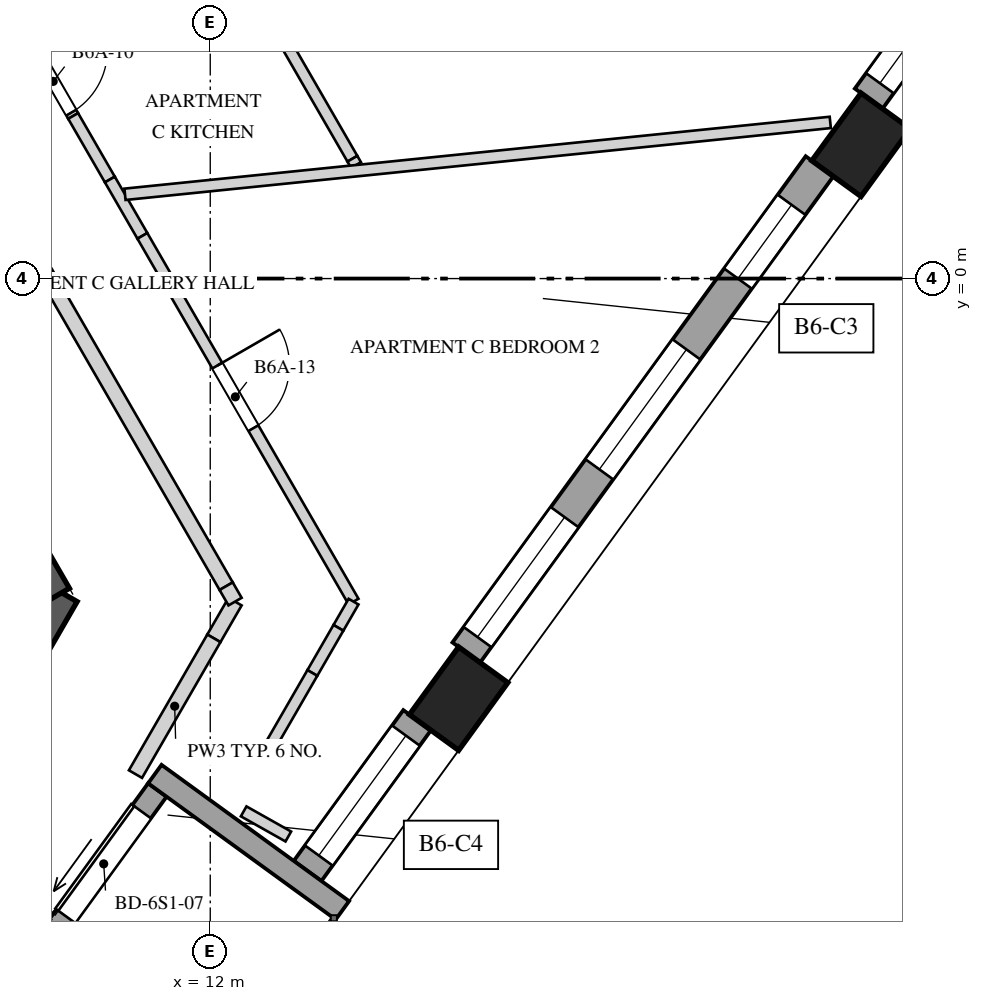
"""IFC4 building model, lengths in metres.
Left out: names, types, materials, properties, quantities, classifications, styles, units other than length and angle.
Written with IfcOpenShell. Run it as: python <this file> out.ifc"""

import sys

from ifc_helpers import new_model, si_unit, direction, frame, frame_2d, origin, origin_2d, place, context, subcontext, project, spatial, polyline, rectangle, outline, extrude, element, fill, save


model = new_model("IFC4")
c1 = context("Model", 3, precision=1e-05, world=origin(), true_north=direction((0.0, 1.0)))
c2 = subcontext(c1, "Body", "Model", "MODEL_VIEW")
j1 = project(units=[si_unit("LENGTHUNIT", "METRE"), si_unit("PLANEANGLEUNIT", "RADIAN")], contexts=[c1])
p1 = place(None, origin())
s1 = spatial("IfcSite", under=j1, at=p1, CompositionType="ELEMENT")
p2 = place(p1, origin())
s2 = spatial("IfcBuilding", under=s1, at=p2, CompositionType="ELEMENT")
p3 = place(p2, frame((0.0, 0.0, 245.2)))
s3 = spatial("IfcBuildingStorey", under=s2, at=p3, CompositionType="ELEMENT", Elevation=245.2)
p4 = place(p3, frame((8.501, -6.575, 0.0), z_axis=(0.0, 0.0, 1.0), x_axis=(0.499995765644, 0.866027848477, 0.0)))
e1 = element("IfcWall", 1, at=p4, inside=s3, PredefinedType="SHEAR", context=c2, shape_type="SweptSolid", body=[
    extrude(rectangle(XDim=2.887, YDim=0.7, at=frame_2d((1.443, 0.0))), origin(), (0.0, 0.0, 1.0), 4.0),
])
p5 = place(p3, frame((9.844, -4.25, 0.0), z_axis=(0.0, 0.0, 1.0), x_axis=(-0.500003331888, 0.866023480109, 0.0)))
e2 = element("IfcWall", 2, at=p5, inside=s3, PredefinedType="SHEAR", context=c2, shape_type="SweptSolid", body=[
    extrude(rectangle(XDim=17.205, YDim=0.7, at=frame_2d((8.603, 0.0))), origin(), (0.0, 0.0, 1.0), 4.0),
])
p6 = place(p5, frame((6.877, 0.0, 0.0)))
e3 = element("IfcOpeningElement", 3, at=p6, cuts=e2, PredefinedType="OPENING", context=c2, shape_type="SweptSolid", body=[
    extrude(rectangle(XDim=1.0, YDim=2.4, at=frame_2d((0.5, 1.2))), frame((0.0, 0.36, 0.0), z_axis=(0.0, -1.0, 0.0), x_axis=(1.0, 0.0, 0.0)), (0.0, 0.0, 1.0), 0.72),
])
for number, where, z_axis, x_axis in (
    (4, (15.268, -5.526, 0.0), (0.0, 0.0, 1.0), (0.588, 0.809, 0.0)),
    (5, (20.562, 1.76, 0.0), (0.0, 0.0, 1.0), (0.588, 0.809, 0.0)),
):
    element("IfcColumn", number, at=place(p3, frame(where, z_axis=z_axis, x_axis=x_axis)), inside=s3, PredefinedType="COLUMN", context=c2, shape_type="SweptSolid", body=[
        extrude(rectangle(XDim=1.1, YDim=0.8, at=origin_2d()), origin(), (0.0, 0.0, 1.0), 4.0),
    ])
p7 = place(p3, frame((13.281, -7.793, 0.0), z_axis=(0.0, 0.0, 1.0), x_axis=(0.587792773076, 0.809011530152, 0.0)))
e6 = element("IfcWall", 6, at=p7, inside=s3, PredefinedType="SOLIDWALL", context=c2, shape_type="SweptSolid", body=[
    extrude(rectangle(XDim=2.452, YDim=0.45, at=frame_2d((1.226, 0.0))), origin(), (0.0, 0.0, 1.0), 3.3),
])
p8 = place(p7, frame((0.251, 0.0, 0.4)))
e7 = element("IfcOpeningElement", 7, at=p8, cuts=e6, PredefinedType="OPENING", context=c2, shape_type="SweptSolid", body=[
    extrude(rectangle(XDim=1.95, YDim=2.75, at=frame_2d((0.975, 1.375))), frame((0.0, 0.235, 0.0), z_axis=(0.0, -1.0, 0.0), x_axis=(1.0, 0.0, 0.0)), (0.0, 0.0, 1.0), 0.47),
])
p9 = place(p3, frame((15.368, -4.92, 0.0), z_axis=(0.0, 0.0, 1.0), x_axis=(0.587782407267, 0.809019061399, 0.0)))
e8 = element("IfcWall", 8, at=p9, inside=s3, PredefinedType="SOLIDWALL", context=c2, shape_type="SweptSolid", body=[
    extrude(rectangle(XDim=7.907, YDim=0.45, at=frame_2d((3.953, 0.0))), origin(), (0.0, 0.0, 1.0), 3.3),
])
p10 = place(p9, frame((0.251, 0.0, 0.4)))
e9 = element("IfcOpeningElement", 9, at=p10, cuts=e8, PredefinedType="OPENING", context=c2, shape_type="SweptSolid", body=[
    extrude(rectangle(XDim=1.95, YDim=2.75, at=frame_2d((0.975, 1.375))), frame((0.0, 0.235, 0.0), z_axis=(0.0, -1.0, 0.0), x_axis=(1.0, 0.0, 0.0)), (0.0, 0.0, 1.0), 0.47),
])
p11 = place(p9, frame((2.978, 0.0, 0.4)))
e10 = element("IfcOpeningElement", 10, at=p11, cuts=e8, PredefinedType="OPENING", context=c2, shape_type="SweptSolid", body=[
    extrude(rectangle(XDim=1.95, YDim=2.75, at=frame_2d((0.975, 1.375))), frame((0.0, 0.235, 0.0), z_axis=(0.0, -1.0, 0.0), x_axis=(1.0, 0.0, 0.0)), (0.0, 0.0, 1.0), 0.47),
])
p12 = place(p9, frame((6.081, 0.0, 0.4)))
e11 = element("IfcOpeningElement", 11, at=p12, cuts=e8, PredefinedType="OPENING", context=c2, shape_type="SweptSolid", body=[
    extrude(rectangle(XDim=1.2, YDim=2.75, at=frame_2d((0.6, 1.375))), frame((0.0, 0.235, 0.0), z_axis=(0.0, -1.0, 0.0), x_axis=(1.0, 0.0, 0.0)), (0.0, 0.0, 1.0), 0.47),
])
p13 = place(p3, frame((20.662, 2.367, 0.0), z_axis=(0.0, 0.0, 1.0), x_axis=(0.587792773076, 0.809011530152, 0.0)))
e12 = element("IfcWall", 12, at=p13, inside=s3, PredefinedType="SOLIDWALL", context=c2, shape_type="SweptSolid", body=[
    extrude(rectangle(XDim=2.452, YDim=0.45, at=frame_2d((1.226, 0.0))), origin(), (0.0, 0.0, 1.0), 3.3),
])
p14 = place(p13, frame((0.251, 0.0, 0.4)))
e13 = element("IfcOpeningElement", 13, at=p14, cuts=e12, PredefinedType="OPENING", context=c2, shape_type="SweptSolid", body=[
    extrude(rectangle(XDim=1.95, YDim=2.75, at=frame_2d((0.975, 1.375))), frame((0.0, 0.235, 0.0), z_axis=(0.0, -1.0, 0.0), x_axis=(1.0, 0.0, 0.0)), (0.0, 0.0, 1.0), 0.47),
])
p15 = place(p3, frame((9.892, -8.672, 0.0), z_axis=(0.0, 0.0, 1.0), x_axis=(0.587833242688, 0.808982125137, 0.0)))
e14 = element("IfcWall", 14, at=p15, inside=s3, PredefinedType="SOLIDWALL", context=c2, shape_type="SweptSolid", body=[
    extrude(rectangle(XDim=2.402, YDim=0.3, at=frame_2d((1.201, 0.0))), origin(), (0.0, 0.0, 1.0), 3.3),
])
p16 = place(p15, frame((0.351, 0.0, 0.0)))
e15 = element("IfcOpeningElement", 15, at=p16, cuts=e14, PredefinedType="OPENING", context=c2, shape_type="SweptSolid", body=[
    extrude(rectangle(XDim=1.7, YDim=2.5, at=frame_2d((0.85, 1.25))), frame((0.0, 0.16, 0.0), z_axis=(0.0, -1.0, 0.0), x_axis=(1.0, 0.0, 0.0)), (0.0, 0.0, 1.0), 0.32),
])
p17 = place(p3, frame((13.739, -8.312, 0.0), z_axis=(0.0, 0.0, 1.0), x_axis=(-0.80902328748, 0.587776590479, 0.0)))
e16 = element("IfcWall", 16, at=p17, inside=s3, PredefinedType="SOLIDWALL", context=c2, shape_type="SweptSolid", body=[
    extrude(rectangle(XDim=3.05, YDim=0.3, at=frame_2d((1.525, 0.0))), origin(), (0.0, 0.0, 1.0), 3.3),
])
p18 = place(p3, frame((9.321, 3.655, 0.0), z_axis=(0.0, 0.0, 1.0), x_axis=(0.499980071345, -0.866036909293, 0.0)))
e17 = element("IfcWall", 17, at=p18, inside=s3, PredefinedType="PARTITIONING", context=c2, shape_type="SweptSolid", body=[
    extrude(outline(polyline([(0.0, 0.0), (1.75, 0.0), (1.75, 3.65), (0.892, 3.65), (0.892, 2.55), (0.0, 2.55), (0.0, 0.0)])), frame((0.0, 0.075, 0.0), z_axis=(0.0, -1.0, 0.0), x_axis=(1.0, 0.0, 0.0)), (0.0, 0.0, 1.0), 0.15),
])
p19 = place(p18, frame((0.75, 0.0, 0.0)))
e18 = element("IfcOpeningElement", 18, at=p19, cuts=e17, PredefinedType="OPENING", context=c2, shape_type="SweptSolid", body=[
    extrude(rectangle(XDim=0.95, YDim=2.4, at=frame_2d((0.475, 1.2))), frame((0.0, 0.085, 0.0), z_axis=(0.0, -1.0, 0.0), x_axis=(1.0, 0.0, 0.0)), (0.0, 0.0, 1.0), 0.17),
])
p20 = place(p3, frame((10.196, 2.139, 0.0), z_axis=(0.0, 0.0, 1.0), x_axis=(0.500109093648, -0.865962409375, 0.0)))
e19 = element("IfcWall", 19, at=p20, inside=s3, PredefinedType="PARTITIONING", context=c2, shape_type="SweptSolid", body=[
    extrude(rectangle(XDim=0.966, YDim=0.15, at=frame_2d((0.483, 0.0))), origin(), (0.0, 0.0, 1.0), 3.65),
])
p21 = place(p3, frame((10.679, 1.303, 0.0), z_axis=(0.0, 0.0, 1.0), x_axis=(0.500035209441, -0.86600507465, 0.0)))
e20 = element("IfcWall", 20, at=p21, inside=s3, PredefinedType="PARTITIONING", context=c2, shape_type="SweptSolid", body=[
    extrude(rectangle(XDim=0.856, YDim=0.15, at=frame_2d((0.428, 0.0))), origin(), (0.0, 0.0, 1.0), 2.75),
])
p22 = place(p3, frame((11.107, 0.562, 0.0), z_axis=(0.0, 0.0, 1.0), x_axis=(0.499981090573, -0.866036320872, 0.0)))
e21 = element("IfcWall", 21, at=p22, inside=s3, PredefinedType="PARTITIONING", context=c2, shape_type="SweptSolid", body=[
    extrude(rectangle(XDim=5.556, YDim=0.15, at=frame_2d((2.778, 0.0))), origin(), (0.0, 0.0, 1.0), 3.65),
])
p23 = place(p22, frame((1.971, 0.0, 0.0)))
e22 = element("IfcOpeningElement", 22, at=p23, cuts=e21, PredefinedType="OPENING", context=c2, shape_type="SweptSolid", body=[
    extrude(rectangle(XDim=0.95, YDim=2.4, at=frame_2d((0.475, 1.2))), frame((0.0, 0.085, 0.0), z_axis=(0.0, -1.0, 0.0), x_axis=(1.0, 0.0, 0.0)), (0.0, 0.0, 1.0), 0.17),
])
p24 = place(p3, frame((12.563, 3.84, 0.0), z_axis=(0.0, 0.0, 1.0), x_axis=(0.500016176693, -0.866016063965, 0.0)))
e23 = element("IfcWall", 23, at=p24, inside=s3, PredefinedType="PARTITIONING", context=c2, shape_type="SweptSolid", body=[
    extrude(rectangle(XDim=2.614, YDim=0.15, at=frame_2d((1.307, 0.0))), origin(), (0.0, 0.0, 1.0), 3.65),
])
p25 = place(p3, frame((13.87, 1.576, 0.0), z_axis=(0.0, 0.0, 1.0), x_axis=(0.49972245349, -0.866185586049, 0.0)))
e24 = element("IfcWall", 24, at=p25, inside=s3, PredefinedType="PARTITIONING", context=c2, shape_type="SweptSolid", body=[
    extrude(rectangle(XDim=0.095, YDim=0.15, at=frame_2d((0.048, 0.0))), origin(), (0.0, 0.0, 1.0), 2.75),
])
p26 = place(p3, frame((12.44, -7.009, 0.0), z_axis=(0.0, 0.0, 1.0), x_axis=(0.871323961853, -0.490708216256, 0.0)))
e25 = element("IfcWall", 25, at=p26, inside=s3, PredefinedType="PARTITIONING", context=c2, shape_type="SweptSolid", body=[
    extrude(rectangle(XDim=0.674, YDim=0.15, at=frame_2d((0.337, 0.0))), origin(), (0.0, 0.0, 1.0), 3.65),
])
p27 = place(p3, frame((13.885, -4.25, 0.0), z_axis=(0.0, 0.0, 1.0), x_axis=(-0.499899443193, -0.866083452501, 0.0)))
e26 = element("IfcWall", 26, at=p27, inside=s3, PredefinedType="PARTITIONING", context=c2, shape_type="SweptSolid", body=[
    extrude(rectangle(XDim=0.398, YDim=0.15, at=frame_2d((0.199, 0.0))), origin(), (0.0, 0.0, 1.0), 3.65),
])
p28 = place(p3, frame((13.686, -4.595, 0.0), z_axis=(0.0, 0.0, 1.0), x_axis=(-0.500081895979, -0.865978115955, 0.0)))
e27 = element("IfcWall", 27, at=p28, inside=s3, PredefinedType="PARTITIONING", context=c2, shape_type="SweptSolid", body=[
    extrude(rectangle(XDim=0.686, YDim=0.15, at=frame_2d((0.343, 0.0))), origin(), (0.0, 0.0, 1.0), 2.95),
])
p29 = place(p3, frame((13.343, -5.189, 0.0), z_axis=(0.0, 0.0, 1.0), x_axis=(-0.500009088543, -0.866020156448, 0.0)))
e28 = element("IfcWall", 28, at=p29, inside=s3, PredefinedType="PARTITIONING", context=c2, shape_type="SweptSolid", body=[
    extrude(rectangle(XDim=1.106, YDim=0.15, at=frame_2d((0.553, 0.0))), origin(), (0.0, 0.0, 1.0), 3.65),
])
p30 = place(p3, frame((20.157, 2.054, 0.0), z_axis=(0.0, 0.0, 1.0), x_axis=(-0.994848051669, -0.101377285871, 0.0)))
e29 = element("IfcWall", 29, at=p30, inside=s3, PredefinedType="PARTITIONING", context=c2, shape_type="SweptSolid", body=[
    extrude(rectangle(XDim=9.327, YDim=0.15, at=frame_2d((4.664, 0.0))), origin(), (0.0, 0.0, 1.0), 2.75),
])
p31 = place(p3, frame((12.326, -4.25, 0.0), z_axis=(0.0, 0.0, 1.0), x_axis=(-0.500000383388, -0.866025182435, 0.0)))
e30 = element("IfcWall", 30, at=p31, inside=s3, PredefinedType="SOLIDWALL", context=c2, shape_type="SweptSolid", body=[
    extrude(rectangle(XDim=0.558, YDim=0.2, at=frame_2d((0.279, 0.0))), origin(), (0.0, 0.0, 1.0), 2.95),
])
p32 = place(p3, frame((12.048, -4.733, 0.0), z_axis=(0.0, 0.0, 1.0), x_axis=(-0.499958106649, -0.866049589571, 0.0)))
e31 = element("IfcWall", 31, at=p32, inside=s3, PredefinedType="SOLIDWALL", context=c2, shape_type="SweptSolid", body=[
    extrude(rectangle(XDim=2.063, YDim=0.2, at=frame_2d((1.031, 0.0))), origin(), (0.0, 0.0, 1.0), 3.65),
])
p33 = place(p3, frame((9.629, 0.423, 0.0), z_axis=(0.0, 0.0, 1.0), x_axis=(0.499995433041, -0.866028040503, 0.0)))
e32 = element("IfcWall", 32, at=p33, inside=s3, PredefinedType="SOLIDWALL", context=c2, shape_type="SweptSolid", body=[
    extrude(rectangle(XDim=5.161, YDim=0.2, at=frame_2d((2.581, 0.0))), origin(), (0.0, 0.0, 1.0), 3.65),
])
p34 = place(p3, frame((12.209, -4.047, 0.0), z_axis=(0.0, 0.0, 1.0), x_axis=(0.49972245349, -0.866185586049, 0.0)))
e33 = element("IfcWall", 33, at=p34, inside=s3, PredefinedType="SOLIDWALL", context=c2, shape_type="SweptSolid", body=[
    extrude(rectangle(XDim=0.235, YDim=0.2, at=frame_2d((0.117, 0.0))), origin(), (0.0, 0.0, 1.0), 2.95),
])
p35 = place(p8, origin())
e34 = element("IfcWindow", 34, at=p35, inside=s3, PartitioningType="SINGLE_PANEL", PredefinedType="WINDOW", context=c2, shape_type="SweptSolid", body=[
    extrude(rectangle(XDim=1.95, YDim=2.75, at=frame_2d((0.975, 1.375))), frame((0.0, 0.03, 0.0), z_axis=(0.0, -1.0, 0.0), x_axis=(1.0, 0.0, 0.0)), (0.0, 0.0, 1.0), 0.06),
])
fill(e7, e34)
p36 = place(p10, origin())
e35 = element("IfcWindow", 35, at=p36, inside=s3, PartitioningType="SINGLE_PANEL", PredefinedType="WINDOW", context=c2, shape_type="SweptSolid", body=[
    extrude(rectangle(XDim=1.95, YDim=2.75, at=frame_2d((0.975, 1.375))), frame((0.0, 0.03, 0.0), z_axis=(0.0, -1.0, 0.0), x_axis=(1.0, 0.0, 0.0)), (0.0, 0.0, 1.0), 0.06),
])
fill(e9, e35)
p37 = place(p11, origin())
e36 = element("IfcWindow", 36, at=p37, inside=s3, PartitioningType="SINGLE_PANEL", PredefinedType="WINDOW", context=c2, shape_type="SweptSolid", body=[
    extrude(rectangle(XDim=1.95, YDim=2.75, at=frame_2d((0.975, 1.375))), frame((0.0, 0.03, 0.0), z_axis=(0.0, -1.0, 0.0), x_axis=(1.0, 0.0, 0.0)), (0.0, 0.0, 1.0), 0.06),
])
fill(e10, e36)
p38 = place(p12, origin())
e37 = element("IfcWindow", 37, at=p38, inside=s3, PartitioningType="SINGLE_PANEL", PredefinedType="WINDOW", context=c2, shape_type="SweptSolid", body=[
    extrude(rectangle(XDim=1.2, YDim=2.75, at=frame_2d((0.6, 1.375))), frame((0.0, 0.03, 0.0), z_axis=(0.0, -1.0, 0.0), x_axis=(1.0, 0.0, 0.0)), (0.0, 0.0, 1.0), 0.06),
])
fill(e11, e37)
p39 = place(p14, origin())
e38 = element("IfcWindow", 38, at=p39, inside=s3, PartitioningType="SINGLE_PANEL", PredefinedType="WINDOW", context=c2, shape_type="SweptSolid", body=[
    extrude(rectangle(XDim=1.95, YDim=2.75, at=frame_2d((0.975, 1.375))), frame((0.0, 0.03, 0.0), z_axis=(0.0, -1.0, 0.0), x_axis=(1.0, 0.0, 0.0)), (0.0, 0.0, 1.0), 0.06),
])
fill(e13, e38)
p40 = place(p16, origin())
e39 = element("IfcDoor", 39, at=p40, inside=s3, OperationType="SLIDING_TO_LEFT", PredefinedType="DOOR", context=c2, shape_type="SweptSolid", body=[
    extrude(rectangle(XDim=1.7, YDim=2.5, at=frame_2d((0.85, 1.25))), frame((0.0, 0.025, 0.0), z_axis=(0.0, -1.0, 0.0), x_axis=(1.0, 0.0, 0.0)), (0.0, 0.0, 1.0), 0.05),
])
fill(e15, e39)
p41 = place(p19, origin())
e40 = element("IfcDoor", 40, at=p41, inside=s3, OperationType="SINGLE_SWING_RIGHT", PredefinedType="DOOR", context=c2, shape_type="SweptSolid", body=[
    extrude(rectangle(XDim=0.95, YDim=2.4, at=frame_2d((0.475, 1.2))), frame((0.0, 0.025, 0.0), z_axis=(0.0, -1.0, 0.0), x_axis=(1.0, 0.0, 0.0)), (0.0, 0.0, 1.0), 0.05),
])
fill(e18, e40)
p42 = place(p23, origin())
e41 = element("IfcDoor", 41, at=p42, inside=s3, OperationType="SINGLE_SWING_LEFT", PredefinedType="DOOR", context=c2, shape_type="SweptSolid", body=[
    extrude(rectangle(XDim=0.95, YDim=2.4, at=frame_2d((0.475, 1.2))), frame((0.0, 0.025, 0.0), z_axis=(0.0, -1.0, 0.0), x_axis=(1.0, 0.0, 0.0)), (0.0, 0.0, 1.0), 0.05),
])
fill(e22, e41)
save(model, sys.argv[1])
